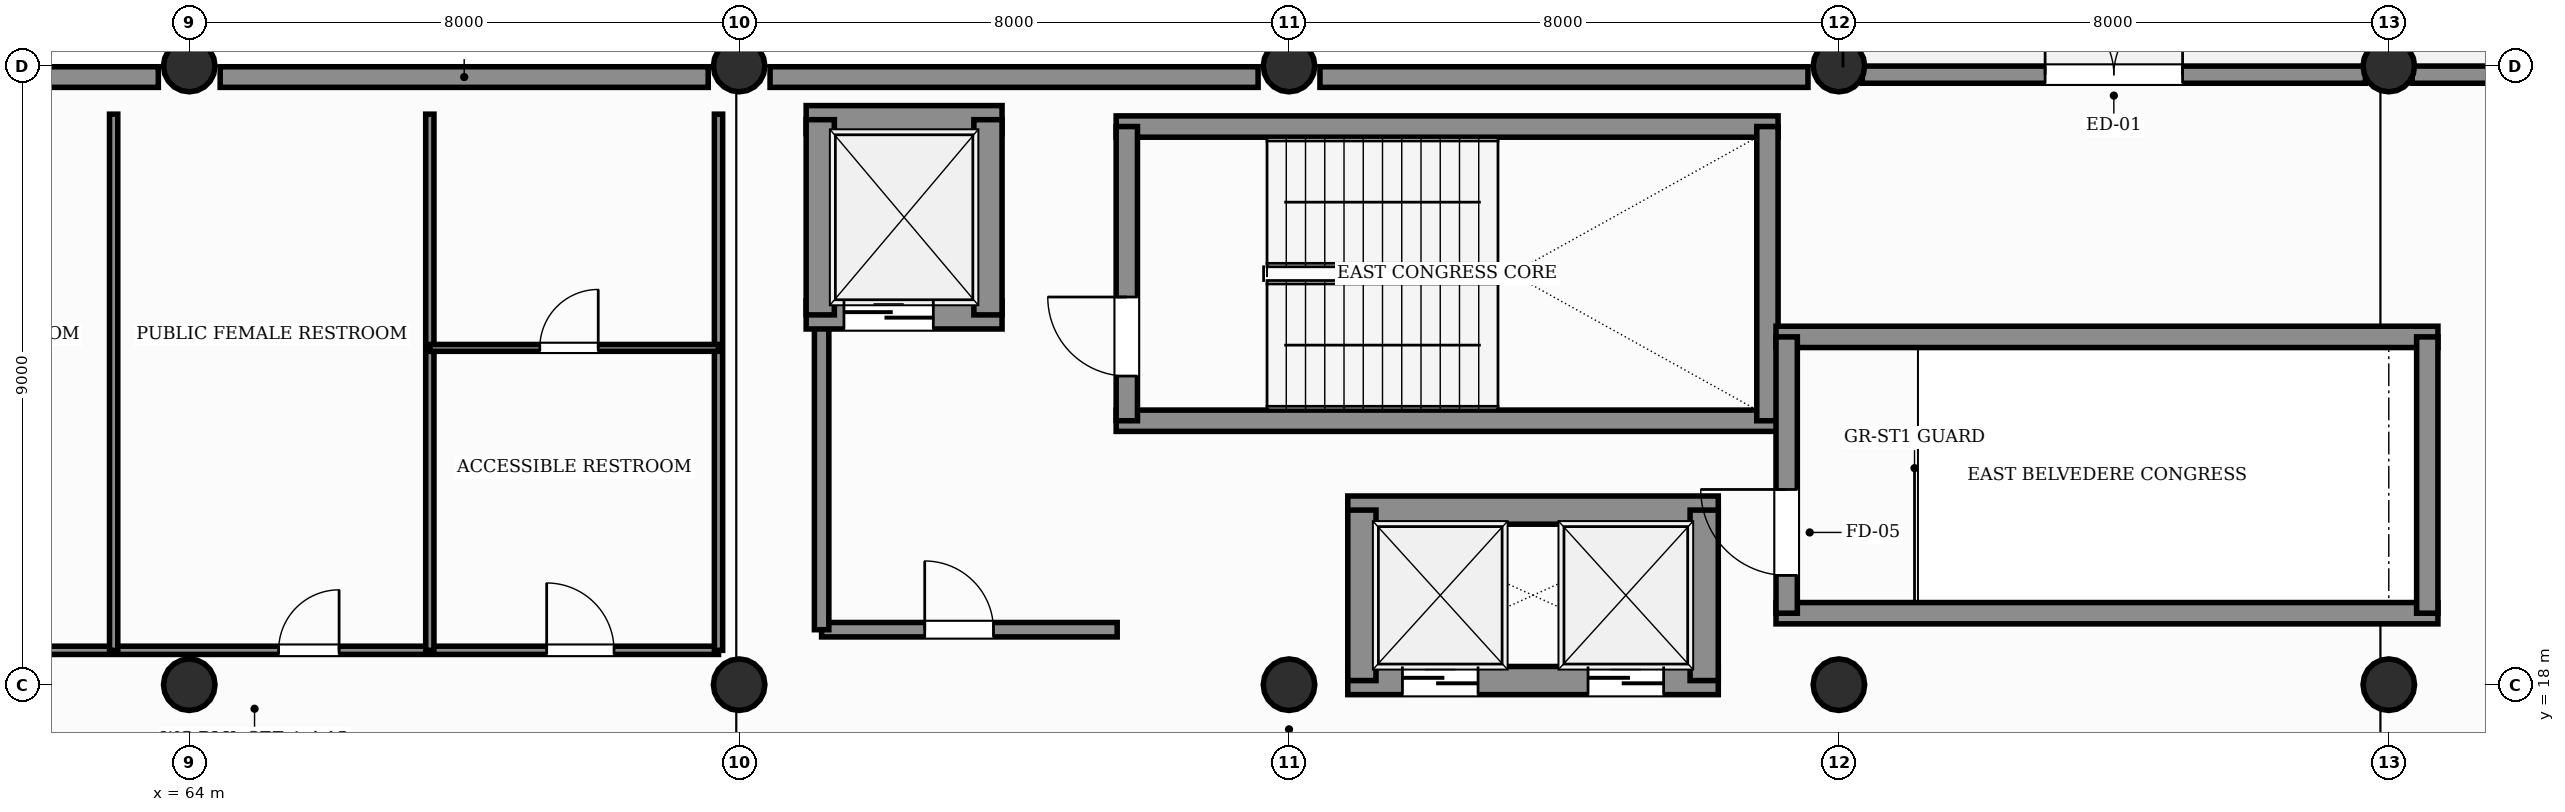
"""IFC4 building model, lengths in metres.
Left out: names, types, materials, properties, quantities, classifications, styles, units other than length and angle.
Written with IfcOpenShell. Run it as: python <this file> out.ifc"""

import sys

from ifc_helpers import new_model, si_unit, direction, frame, frame_2d, origin, origin_2d, place, context, subcontext, project, spatial, rectangle, circle, extrude, element, fill, save


model = new_model("IFC4")
c1 = context("Model", 3, precision=1e-05, world=origin(), true_north=direction((0.0, 1.0)))
c2 = subcontext(c1, "Body", "Model", "MODEL_VIEW")
j1 = project(units=[si_unit("LENGTHUNIT", "METRE"), si_unit("PLANEANGLEUNIT", "RADIAN")], contexts=[c1])
p1 = place(None, origin())
s1 = spatial("IfcSite", under=j1, at=p1, CompositionType="ELEMENT")
p2 = place(p1, origin())
s2 = spatial("IfcBuilding", under=s1, at=p2, CompositionType="ELEMENT")
p3 = place(p2, frame((0.0, 0.0, 16.2)))
s3 = spatial("IfcBuildingStorey", under=s2, at=p3, CompositionType="ELEMENT", Elevation=16.2)
for number, where, z_axis, x_axis in (
    (1, (64.0, 18.0, 0.0), (0.0, 0.0, 1.0), (1.0, 0.0, 0.0)),
    (2, (64.0, 27.0, 0.0), (0.0, 0.0, 1.0), (1.0, 0.0, 0.0)),
    (3, (72.0, 18.0, 0.0), (0.0, 0.0, 1.0), (1.0, 0.0, 0.0)),
    (4, (72.0, 27.0, 0.0), (0.0, 0.0, 1.0), (1.0, 0.0, 0.0)),
    (5, (80.0, 18.0, 0.0), (0.0, 0.0, 1.0), (1.0, 0.0, 0.0)),
    (6, (80.0, 27.0, 0.0), (0.0, 0.0, 1.0), (1.0, 0.0, 0.0)),
    (7, (88.0, 18.0, 0.0), (0.0, 0.0, 1.0), (1.0, 0.0, 0.0)),
    (8, (88.0, 27.0, 0.0), (0.0, 0.0, 1.0), (1.0, 0.0, 0.0)),
    (9, (96.0, 18.0, 0.0), (0.0, 0.0, 1.0), (1.0, 0.0, 0.0)),
    (10, (96.0, 27.0, 0.0), (0.0, 0.0, 1.0), (1.0, 0.0, 0.0)),
):
    element("IfcColumn", number, at=place(p3, frame(where, z_axis=z_axis, x_axis=x_axis)), inside=s3, PredefinedType="COLUMN", context=c2, shape_type="SweptSolid", body=[
        extrude(circle(Radius=0.375, at=origin_2d()), origin(), (0.0, 0.0, 1.0), 4.8),
    ])
for number, where, z_axis, x_axis in (
    (11, (56.45, 26.84, 0.0), (0.0, 0.0, 1.0), (1.0, 0.0, 0.0)),
    (12, (64.45, 26.84, 0.0), (0.0, 0.0, 1.0), (1.0, 0.0, 0.0)),
    (13, (72.45, 26.84, 0.0), (0.0, 0.0, 1.0), (1.0, 0.0, 0.0)),
    (14, (80.45, 26.84, 0.0), (0.0, 0.0, 1.0), (1.0, 0.0, 0.0)),
):
    element("IfcWall", number, at=place(p3, frame(where, z_axis=z_axis, x_axis=x_axis)), inside=s3, PredefinedType="SOLIDWALL", context=c2, shape_type="SweptSolid", body=[
        extrude(rectangle(XDim=7.1, YDim=0.3, at=frame_2d((3.55, 0.0))), origin(), (0.0, 0.0, 1.0), 3.6),
    ])
p4 = place(p3, frame((88.34, 26.875, 0.0), z_axis=(0.0, 0.0, 1.0), x_axis=(1.0, 0.0, 0.0)))
e15 = element("IfcWall", 15, at=p4, inside=s3, PredefinedType="SOLIDWALL", context=c2, shape_type="SweptSolid", body=[
    extrude(rectangle(XDim=7.32, YDim=0.25, at=frame_2d((3.66, 0.0))), origin(), (0.0, 0.0, 1.0), 3.6),
])
p5 = place(p4, frame((2.66, 0.0, 0.0)))
e16 = element("IfcOpeningElement", 16, at=p5, cuts=e15, PredefinedType="OPENING", context=c2, shape_type="SweptSolid", body=[
    extrude(rectangle(XDim=2.0, YDim=2.4, at=frame_2d((1.0, 1.2))), frame((0.0, 0.135, 0.0), z_axis=(0.0, -1.0, 0.0), x_axis=(1.0, 0.0, 0.0)), (0.0, 0.0, 1.0), 0.27),
])
p6 = place(p3, frame((96.34, 26.875, 0.0), z_axis=(0.0, 0.0, 1.0), x_axis=(1.0, 0.0, 0.0)))
e17 = element("IfcWall", 17, at=p6, inside=s3, PredefinedType="SOLIDWALL", context=c2, shape_type="SweptSolid", body=[
    extrude(rectangle(XDim=7.32, YDim=0.25, at=frame_2d((3.66, 0.0))), origin(), (0.0, 0.0, 1.0), 3.6),
])
p7 = place(p6, frame((2.66, 0.0, 0.0)))
e18 = element("IfcOpeningElement", 18, at=p7, cuts=e17, PredefinedType="OPENING", context=c2, shape_type="SweptSolid", body=[
    extrude(rectangle(XDim=2.0, YDim=2.4, at=frame_2d((1.0, 1.2))), frame((0.0, 0.135, 0.0), z_axis=(0.0, -1.0, 0.0), x_axis=(1.0, 0.0, 0.0)), (0.0, 0.0, 1.0), 0.27),
])
for number, where, z_axis, x_axis in (
    (19, (77.485, 21.84, 0.0), (0.0, 0.0, 1.0), (1.0, 0.0, 0.0)),
    (20, (77.485, 26.12, 0.0), (0.0, 0.0, 1.0), (1.0, 0.0, 0.0)),
):
    element("IfcWall", number, at=place(p3, frame(where, z_axis=z_axis, x_axis=x_axis)), inside=s3, PredefinedType="SHEAR", context=c2, shape_type="SweptSolid", body=[
        extrude(rectangle(XDim=9.63, YDim=0.31, at=frame_2d((4.815, 0.0))), origin(), (0.0, 0.0, 1.0), 4.8),
    ])
p8 = place(p3, frame((77.64, 21.84, 0.0), z_axis=(0.0, 0.0, 1.0), x_axis=(0.0, 1.0, 0.0)))
e21 = element("IfcWall", 21, at=p8, inside=s3, PredefinedType="SHEAR", context=c2, shape_type="SweptSolid", body=[
    extrude(rectangle(XDim=4.28, YDim=0.31, at=frame_2d((2.14, 0.0))), origin(), (0.0, 0.0, 1.0), 4.8),
])
p9 = place(p8, frame((0.65, 0.0, 0.0)))
e22 = element("IfcOpeningElement", 22, at=p9, cuts=e21, PredefinedType="OPENING", context=c2, shape_type="SweptSolid", body=[
    extrude(rectangle(XDim=1.15, YDim=2.2, at=frame_2d((0.575, 1.1))), frame((0.0, 0.165, 0.0), z_axis=(0.0, -1.0, 0.0), x_axis=(1.0, 0.0, 0.0)), (0.0, 0.0, 1.0), 0.33),
])
p10 = place(p3, frame((86.96, 21.84, 0.0), z_axis=(0.0, 0.0, 1.0), x_axis=(0.0, 1.0, 0.0)))
e23 = element("IfcWall", 23, at=p10, inside=s3, PredefinedType="SHEAR", context=c2, shape_type="SweptSolid", body=[
    extrude(rectangle(XDim=4.28, YDim=0.31, at=frame_2d((2.14, 0.0))), origin(), (0.0, 0.0, 1.0), 4.8),
])
p11 = place(p3, frame((73.2, 18.8, 0.0), z_axis=(0.0, 0.0, 1.0), x_axis=(1.0, 0.0, 0.0)))
e24 = element("IfcWall", 24, at=p11, inside=s3, PredefinedType="PARTITIONING", context=c2, shape_type="SweptSolid", body=[
    extrude(rectangle(XDim=4.3, YDim=0.21, at=frame_2d((2.15, 0.0))), origin(), (0.0, 0.0, 1.0), 3.55),
])
p12 = place(p11, frame((1.5, 0.0, 0.0)))
e25 = element("IfcOpeningElement", 25, at=p12, cuts=e24, PredefinedType="OPENING", context=c2, shape_type="SweptSolid", body=[
    extrude(rectangle(XDim=1.0, YDim=2.15, at=frame_2d((0.5, 1.075))), frame((0.0, 0.115, 0.0), z_axis=(0.0, -1.0, 0.0), x_axis=(1.0, 0.0, 0.0)), (0.0, 0.0, 1.0), 0.23),
])
p13 = place(p3, frame((73.2, 18.8, 0.0), z_axis=(0.0, 0.0, 1.0), x_axis=(0.0, 1.0, 0.0)))
e26 = element("IfcWall", 26, at=p13, inside=s3, PredefinedType="PARTITIONING", context=c2, shape_type="SweptSolid", body=[
    extrude(rectangle(XDim=4.6, YDim=0.21, at=frame_2d((2.3, 0.0))), origin(), (0.0, 0.0, 1.0), 3.55),
])
p14 = place(p3, frame((72.975, 23.38, 0.0), z_axis=(0.0, 0.0, 1.0), x_axis=(1.0, 0.0, 0.0)))
e27 = element("IfcWall", 27, at=p14, inside=s3, PredefinedType="SHEAR", context=c2, shape_type="SweptSolid", body=[
    extrude(rectangle(XDim=2.85, YDim=0.41, at=frame_2d((1.425, 0.0))), origin(), (0.0, 0.0, 1.0), 4.8),
])
p15 = place(p14, frame((0.55, 0.0, 0.0)))
e28 = element("IfcOpeningElement", 28, at=p15, cuts=e27, PredefinedType="OPENING", context=c2, shape_type="SweptSolid", body=[
    extrude(rectangle(XDim=1.3, YDim=2.25, at=frame_2d((0.65, 1.125))), frame((0.0, 0.215, 0.0), z_axis=(0.0, -1.0, 0.0), x_axis=(1.0, 0.0, 0.0)), (0.0, 0.0, 1.0), 0.43),
])
p16 = place(p3, frame((72.975, 26.22, 0.0), z_axis=(0.0, 0.0, 1.0), x_axis=(1.0, 0.0, 0.0)))
e29 = element("IfcWall", 29, at=p16, inside=s3, PredefinedType="SHEAR", context=c2, shape_type="SweptSolid", body=[
    extrude(rectangle(XDim=2.85, YDim=0.41, at=frame_2d((1.425, 0.0))), origin(), (0.0, 0.0, 1.0), 4.8),
])
for number, where, z_axis, x_axis in (
    (30, (73.18, 23.38, 0.0), (0.0, 0.0, 1.0), (0.0, 1.0, 0.0)),
    (31, (75.62, 23.38, 0.0), (0.0, 0.0, 1.0), (0.0, 1.0, 0.0)),
):
    element("IfcWall", number, at=place(p3, frame(where, z_axis=z_axis, x_axis=x_axis)), inside=s3, PredefinedType="SHEAR", context=c2, shape_type="SweptSolid", body=[
        extrude(rectangle(XDim=2.84, YDim=0.41, at=frame_2d((1.42, 0.0))), origin(), (0.0, 0.0, 1.0), 4.8),
    ])
p17 = place(p3, frame((80.855, 18.06, 0.0), z_axis=(0.0, 0.0, 1.0), x_axis=(1.0, 0.0, 0.0)))
e32 = element("IfcWall", 32, at=p17, inside=s3, PredefinedType="SHEAR", context=c2, shape_type="SweptSolid", body=[
    extrude(rectangle(XDim=5.39, YDim=0.41, at=frame_2d((2.695, 0.0))), origin(), (0.0, 0.0, 1.0), 4.8),
])
p18 = place(p17, frame((0.795, 0.0, 0.0)))
e33 = element("IfcOpeningElement", 33, at=p18, cuts=e32, PredefinedType="OPENING", context=c2, shape_type="SweptSolid", body=[
    extrude(rectangle(XDim=1.1, YDim=2.2, at=frame_2d((0.55, 1.1))), frame((0.0, 0.215, 0.0), z_axis=(0.0, -1.0, 0.0), x_axis=(1.0, 0.0, 0.0)), (0.0, 0.0, 1.0), 0.43),
])
p19 = place(p17, frame((3.495, 0.0, 0.0)))
e34 = element("IfcOpeningElement", 34, at=p19, cuts=e32, PredefinedType="OPENING", context=c2, shape_type="SweptSolid", body=[
    extrude(rectangle(XDim=1.1, YDim=2.2, at=frame_2d((0.55, 1.1))), frame((0.0, 0.215, 0.0), z_axis=(0.0, -1.0, 0.0), x_axis=(1.0, 0.0, 0.0)), (0.0, 0.0, 1.0), 0.43),
])
p20 = place(p3, frame((80.855, 20.54, 0.0), z_axis=(0.0, 0.0, 1.0), x_axis=(1.0, 0.0, 0.0)))
e35 = element("IfcWall", 35, at=p20, inside=s3, PredefinedType="SHEAR", context=c2, shape_type="SweptSolid", body=[
    extrude(rectangle(XDim=5.39, YDim=0.41, at=frame_2d((2.695, 0.0))), origin(), (0.0, 0.0, 1.0), 4.8),
])
for number, where, z_axis, x_axis in (
    (36, (81.06, 18.06, 0.0), (0.0, 0.0, 1.0), (0.0, 1.0, 0.0)),
    (37, (86.04, 18.06, 0.0), (0.0, 0.0, 1.0), (0.0, 1.0, 0.0)),
):
    element("IfcWall", number, at=place(p3, frame(where, z_axis=z_axis, x_axis=x_axis)), inside=s3, PredefinedType="SHEAR", context=c2, shape_type="SweptSolid", body=[
        extrude(rectangle(XDim=2.48, YDim=0.41, at=frame_2d((1.24, 0.0))), origin(), (0.0, 0.0, 1.0), 4.8),
    ])
for number, where, z_axis, x_axis in (
    (38, (87.085, 19.04, 0.0), (0.0, 0.0, 1.0), (1.0, 0.0, 0.0)),
    (39, (87.085, 23.06, 0.0), (0.0, 0.0, 1.0), (1.0, 0.0, 0.0)),
):
    element("IfcWall", number, at=place(p3, frame(where, z_axis=z_axis, x_axis=x_axis)), inside=s3, PredefinedType="SHEAR", context=c2, shape_type="SweptSolid", body=[
        extrude(rectangle(XDim=9.63, YDim=0.31, at=frame_2d((4.815, 0.0))), origin(), (0.0, 0.0, 1.0), 4.8),
    ])
p21 = place(p3, frame((87.24, 19.04, 0.0), z_axis=(0.0, 0.0, 1.0), x_axis=(0.0, 1.0, 0.0)))
e40 = element("IfcWall", 40, at=p21, inside=s3, PredefinedType="SHEAR", context=c2, shape_type="SweptSolid", body=[
    extrude(rectangle(XDim=4.02, YDim=0.31, at=frame_2d((2.01, 0.0))), origin(), (0.0, 0.0, 1.0), 4.8),
])
p22 = place(p21, frame((0.55, 0.0, 0.0)))
e41 = element("IfcOpeningElement", 41, at=p22, cuts=e40, PredefinedType="OPENING", context=c2, shape_type="SweptSolid", body=[
    extrude(rectangle(XDim=1.25, YDim=2.2, at=frame_2d((0.625, 1.1))), frame((0.0, 0.165, 0.0), z_axis=(0.0, -1.0, 0.0), x_axis=(1.0, 0.0, 0.0)), (0.0, 0.0, 1.0), 0.33),
])
p23 = place(p3, frame((96.56, 19.04, 0.0), z_axis=(0.0, 0.0, 1.0), x_axis=(0.0, 1.0, 0.0)))
e42 = element("IfcWall", 42, at=p23, inside=s3, PredefinedType="SHEAR", context=c2, shape_type="SweptSolid", body=[
    extrude(rectangle(XDim=4.02, YDim=0.31, at=frame_2d((2.01, 0.0))), origin(), (0.0, 0.0, 1.0), 4.8),
])
p24 = place(p3, frame((58.3, 18.5, 0.0), z_axis=(0.0, 0.0, 1.0), x_axis=(1.0, 0.0, 0.0)))
e43 = element("IfcWall", 43, at=p24, inside=s3, PredefinedType="PARTITIONING", context=c2, shape_type="SweptSolid", body=[
    extrude(rectangle(XDim=13.4, YDim=0.12, at=frame_2d((6.7, 0.0))), origin(), (0.0, 0.0, 1.0), 3.55),
])
p25 = place(p24, frame((1.8, 0.0, 0.0)))
e44 = element("IfcOpeningElement", 44, at=p25, cuts=e43, PredefinedType="OPENING", context=c2, shape_type="SweptSolid", body=[
    extrude(rectangle(XDim=0.88, YDim=2.1, at=frame_2d((0.44, 1.05))), frame((0.0, 0.07, 0.0), z_axis=(0.0, -1.0, 0.0), x_axis=(1.0, 0.0, 0.0)), (0.0, 0.0, 1.0), 0.14),
])
p26 = place(p24, frame((7.0, 0.0, 0.0)))
e45 = element("IfcOpeningElement", 45, at=p26, cuts=e43, PredefinedType="OPENING", context=c2, shape_type="SweptSolid", body=[
    extrude(rectangle(XDim=0.88, YDim=2.1, at=frame_2d((0.44, 1.05))), frame((0.0, 0.07, 0.0), z_axis=(0.0, -1.0, 0.0), x_axis=(1.0, 0.0, 0.0)), (0.0, 0.0, 1.0), 0.14),
])
p27 = place(p24, frame((10.9, 0.0, 0.0)))
e46 = element("IfcOpeningElement", 46, at=p27, cuts=e43, PredefinedType="OPENING", context=c2, shape_type="SweptSolid", body=[
    extrude(rectangle(XDim=0.98, YDim=2.15, at=frame_2d((0.49, 1.075))), frame((0.0, 0.07, 0.0), z_axis=(0.0, -1.0, 0.0), x_axis=(1.0, 0.0, 0.0)), (0.0, 0.0, 1.0), 0.14),
])
for number, where, z_axis, x_axis in (
    (47, (62.9, 18.5, 0.0), (0.0, 0.0, 1.0), (0.0, 1.0, 0.0)),
    (48, (67.5, 18.5, 0.0), (0.0, 0.0, 1.0), (0.0, 1.0, 0.0)),
    (49, (71.7, 18.5, 0.0), (0.0, 0.0, 1.0), (0.0, 1.0, 0.0)),
):
    element("IfcWall", number, at=place(p3, frame(where, z_axis=z_axis, x_axis=x_axis)), inside=s3, PredefinedType="PARTITIONING", context=c2, shape_type="SweptSolid", body=[
        extrude(rectangle(XDim=7.8, YDim=0.12, at=frame_2d((3.9, 0.0))), origin(), (0.0, 0.0, 1.0), 3.55),
    ])
p28 = place(p3, frame((67.5, 22.9, 0.0), z_axis=(0.0, 0.0, 1.0), x_axis=(1.0, 0.0, 0.0)))
e50 = element("IfcWall", 50, at=p28, inside=s3, PredefinedType="PARTITIONING", context=c2, shape_type="SweptSolid", body=[
    extrude(rectangle(XDim=4.2, YDim=0.1, at=frame_2d((2.1, 0.0))), origin(), (0.0, 0.0, 1.0), 3.55),
])
p29 = place(p28, frame((1.6, 0.0, 0.0)))
e51 = element("IfcOpeningElement", 51, at=p29, cuts=e50, PredefinedType="OPENING", context=c2, shape_type="SweptSolid", body=[
    extrude(rectangle(XDim=0.85, YDim=2.1, at=frame_2d((0.425, 1.05))), frame((0.0, 0.06, 0.0), z_axis=(0.0, -1.0, 0.0), x_axis=(1.0, 0.0, 0.0)), (0.0, 0.0, 1.0), 0.12),
])
p30 = place(p5, origin())
e52 = element("IfcDoor", 52, at=p30, inside=s3, OperationType="DOUBLE_DOOR_SINGLE_SWING", PredefinedType="DOOR", context=c2, shape_type="SweptSolid", body=[
    extrude(rectangle(XDim=2.0, YDim=2.4, at=frame_2d((1.0, 1.2))), frame((0.0, 0.025, 0.0), z_axis=(0.0, -1.0, 0.0), x_axis=(1.0, 0.0, 0.0)), (0.0, 0.0, 1.0), 0.05),
])
fill(e16, e52)
p31 = place(p9, origin())
e53 = element("IfcDoor", 53, at=p31, inside=s3, OperationType="SINGLE_SWING_RIGHT", PredefinedType="DOOR", context=c2, shape_type="SweptSolid", body=[
    extrude(rectangle(XDim=1.15, YDim=2.2, at=frame_2d((0.575, 1.1))), frame((0.0, 0.025, 0.0), z_axis=(0.0, -1.0, 0.0), x_axis=(1.0, 0.0, 0.0)), (0.0, 0.0, 1.0), 0.05),
])
fill(e22, e53)
p32 = place(p12, origin())
e54 = element("IfcDoor", 54, at=p32, inside=s3, OperationType="SINGLE_SWING_LEFT", PredefinedType="DOOR", context=c2, shape_type="SweptSolid", body=[
    extrude(rectangle(XDim=1.0, YDim=2.15, at=frame_2d((0.5, 1.075))), frame((0.0, 0.025, 0.0), z_axis=(0.0, -1.0, 0.0), x_axis=(1.0, 0.0, 0.0)), (0.0, 0.0, 1.0), 0.05),
])
fill(e25, e54)
p33 = place(p15, origin())
e55 = element("IfcDoor", 55, at=p33, inside=s3, OperationType="DOUBLE_DOOR_SLIDING", PredefinedType="DOOR", context=c2, shape_type="SweptSolid", body=[
    extrude(rectangle(XDim=1.3, YDim=2.25, at=frame_2d((0.65, 1.125))), frame((0.0, 0.025, 0.0), z_axis=(0.0, -1.0, 0.0), x_axis=(1.0, 0.0, 0.0)), (0.0, 0.0, 1.0), 0.05),
])
fill(e28, e55)
p34 = place(p18, origin())
e56 = element("IfcDoor", 56, at=p34, inside=s3, OperationType="DOUBLE_DOOR_SLIDING", PredefinedType="DOOR", context=c2, shape_type="SweptSolid", body=[
    extrude(rectangle(XDim=1.1, YDim=2.2, at=frame_2d((0.55, 1.1))), frame((0.0, 0.025, 0.0), z_axis=(0.0, -1.0, 0.0), x_axis=(1.0, 0.0, 0.0)), (0.0, 0.0, 1.0), 0.05),
])
fill(e33, e56)
p35 = place(p19, origin())
e57 = element("IfcDoor", 57, at=p35, inside=s3, OperationType="DOUBLE_DOOR_SLIDING", PredefinedType="DOOR", context=c2, shape_type="SweptSolid", body=[
    extrude(rectangle(XDim=1.1, YDim=2.2, at=frame_2d((0.55, 1.1))), frame((0.0, 0.025, 0.0), z_axis=(0.0, -1.0, 0.0), x_axis=(1.0, 0.0, 0.0)), (0.0, 0.0, 1.0), 0.05),
])
fill(e34, e57)
p36 = place(p22, origin())
e58 = element("IfcDoor", 58, at=p36, inside=s3, OperationType="SINGLE_SWING_RIGHT", PredefinedType="DOOR", context=c2, shape_type="SweptSolid", body=[
    extrude(rectangle(XDim=1.25, YDim=2.2, at=frame_2d((0.625, 1.1))), frame((0.0, 0.025, 0.0), z_axis=(0.0, -1.0, 0.0), x_axis=(1.0, 0.0, 0.0)), (0.0, 0.0, 1.0), 0.05),
])
fill(e41, e58)
p37 = place(p26, origin())
e59 = element("IfcDoor", 59, at=p37, inside=s3, OperationType="SINGLE_SWING_RIGHT", PredefinedType="DOOR", context=c2, shape_type="SweptSolid", body=[
    extrude(rectangle(XDim=0.88, YDim=2.1, at=frame_2d((0.44, 1.05))), frame((0.0, 0.025, 0.0), z_axis=(0.0, -1.0, 0.0), x_axis=(1.0, 0.0, 0.0)), (0.0, 0.0, 1.0), 0.05),
])
fill(e45, e59)
p38 = place(p27, origin())
e60 = element("IfcDoor", 60, at=p38, inside=s3, OperationType="SINGLE_SWING_LEFT", PredefinedType="DOOR", context=c2, shape_type="SweptSolid", body=[
    extrude(rectangle(XDim=0.98, YDim=2.15, at=frame_2d((0.49, 1.075))), frame((0.0, 0.025, 0.0), z_axis=(0.0, -1.0, 0.0), x_axis=(1.0, 0.0, 0.0)), (0.0, 0.0, 1.0), 0.05),
])
fill(e46, e60)
p39 = place(p29, origin())
e61 = element("IfcDoor", 61, at=p39, inside=s3, OperationType="SINGLE_SWING_RIGHT", PredefinedType="DOOR", context=c2, shape_type="SweptSolid", body=[
    extrude(rectangle(XDim=0.85, YDim=2.1, at=frame_2d((0.425, 1.05))), frame((0.0, 0.025, 0.0), z_axis=(0.0, -1.0, 0.0), x_axis=(1.0, 0.0, 0.0)), (0.0, 0.0, 1.0), 0.05),
])
fill(e51, e61)
save(model, sys.argv[1])
